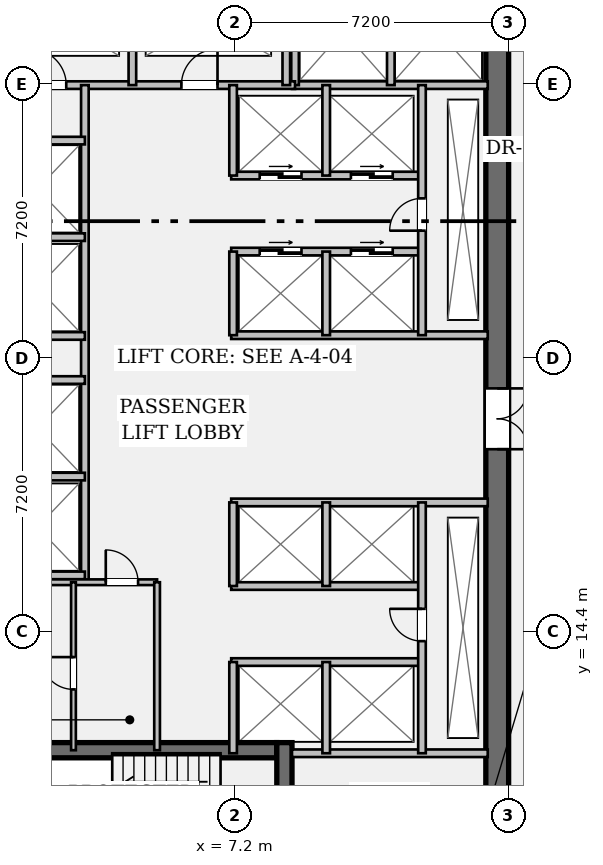
"""IFC4 building model, lengths in metres.
Left out: names, types, materials, properties, quantities, classifications, styles, units other than length and angle.
Written with IfcOpenShell. Run it as: python <this file> out.ifc"""

import sys

from ifc_helpers import new_model, si_unit, direction, frame, frame_2d, origin, place, context, subcontext, project, spatial, rectangle, extrude, element, fill, save


model = new_model("IFC4")
c1 = context("Model", 3, precision=1e-05, world=origin(), true_north=direction((0.0, 1.0)))
c2 = subcontext(c1, "Body", "Model", "MODEL_VIEW")
j1 = project(units=[si_unit("LENGTHUNIT", "METRE"), si_unit("PLANEANGLEUNIT", "RADIAN")], contexts=[c1])
p1 = place(None, origin())
s1 = spatial("IfcSite", under=j1, at=p1, CompositionType="ELEMENT")
p2 = place(p1, origin())
s2 = spatial("IfcBuilding", under=s1, at=p2, CompositionType="ELEMENT")
p3 = place(p2, frame((0.0, 0.0, 46.55)))
s3 = spatial("IfcBuildingStorey", under=s2, at=p3, CompositionType="ELEMENT", Elevation=46.55)
p4 = place(p3, frame((14.1, 35.4, 0.0), z_axis=(0.0, 0.0, 1.0), x_axis=(0.0, -1.0, 0.0)))
e1 = element("IfcWall", 1, at=p4, inside=s3, PredefinedType="SHEAR", context=c2, shape_type="SweptSolid", body=[
    extrude(rectangle(XDim=27.6, YDim=0.6, at=frame_2d((13.8, 0.0))), origin(), (0.0, 0.0, 1.0), 3.57),
])
p5 = place(p4, frame((1.3, 0.0, 0.0)))
e2 = element("IfcOpeningElement", 2, at=p5, cuts=e1, PredefinedType="OPENING", context=c2, shape_type="SweptSolid", body=[
    extrude(rectangle(XDim=1.2, YDim=2.15, at=frame_2d((0.6, 1.075))), frame((0.0, 0.312, 0.0), z_axis=(0.0, -1.0, 0.0), x_axis=(1.0, 0.0, 0.0)), (0.0, 0.0, 1.0), 0.624),
])
p6 = place(p4, frame((25.25, 0.0, 0.0)))
e3 = element("IfcOpeningElement", 3, at=p6, cuts=e1, PredefinedType="OPENING", context=c2, shape_type="SweptSolid", body=[
    extrude(rectangle(XDim=1.2, YDim=2.15, at=frame_2d((0.6, 1.075))), frame((0.0, 0.312, 0.0), z_axis=(0.0, -1.0, 0.0), x_axis=(1.0, 0.0, 0.0)), (0.0, 0.0, 1.0), 0.624),
])
p7 = place(p4, frame((14.6, 0.0, 0.0)))
e4 = element("IfcOpeningElement", 4, at=p7, cuts=e1, PredefinedType="OPENING", context=c2, shape_type="SweptSolid", body=[
    extrude(rectangle(XDim=1.6, YDim=2.2, at=frame_2d((0.8, 1.1))), frame((0.0, 0.312, 0.0), z_axis=(0.0, -1.0, 0.0), x_axis=(1.0, 0.0, 0.0)), (0.0, 0.0, 1.0), 0.624),
])
p8 = place(p3, frame((0.6, 11.28, 0.0), z_axis=(0.0, 0.0, 1.0), x_axis=(1.0, 0.0, 0.0)))
e5 = element("IfcWall", 5, at=p8, inside=s3, PredefinedType="SHEAR", context=c2, shape_type="SweptSolid", body=[
    extrude(rectangle(XDim=7.7, YDim=0.4, at=frame_2d((3.85, 0.0))), origin(), (0.0, 0.0, 1.0), 3.57),
])
p9 = place(p3, frame((8.5, 7.8, 0.0), z_axis=(0.0, 0.0, 1.0), x_axis=(0.0, 1.0, 0.0)))
e6 = element("IfcWall", 6, at=p9, inside=s3, PredefinedType="SHEAR", context=c2, shape_type="SweptSolid", body=[
    extrude(rectangle(XDim=3.68, YDim=0.4, at=frame_2d((1.84, 0.0))), origin(), (0.0, 0.0, 1.0), 3.57),
])
p10 = place(p9, frame((0.85, 0.0, 0.0)))
e7 = element("IfcOpeningElement", 7, at=p10, cuts=e6, PredefinedType="OPENING", context=c2, shape_type="SweptSolid", body=[
    extrude(rectangle(XDim=1.1, YDim=2.15, at=frame_2d((0.55, 1.075))), frame((0.0, 0.212, 0.0), z_axis=(0.0, -1.0, 0.0), x_axis=(1.0, 0.0, 0.0)), (0.0, 0.0, 1.0), 0.424),
])
for number, where, z_axis, x_axis in (
    (8, (8.7, 11.2, 0.0), (0.0, 0.0, 1.0), (1.0, 0.0, 0.0)),
    (9, (8.7, 28.78, 0.0), (0.0, 0.0, 1.0), (1.0, 0.0, 0.0)),
):
    element("IfcWall", number, at=place(p3, frame(where, z_axis=z_axis, x_axis=x_axis)), inside=s3, PredefinedType="PARTITIONING", context=c2, shape_type="SweptSolid", body=[
        extrude(rectangle(XDim=5.15, YDim=0.2, at=frame_2d((2.575, 0.0))), origin(), (0.0, 0.0, 1.0), 3.57),
    ])
for number, where, z_axis, x_axis in (
    (10, (8.78, 28.78, 0.0), (0.0, 0.0, 1.0), (0.0, 1.0, 0.0)),
    (11, (11.3, 28.78, 0.0), (0.0, 0.0, 1.0), (0.0, 1.0, 0.0)),
):
    element("IfcWall", number, at=place(p3, frame(where, z_axis=z_axis, x_axis=x_axis)), inside=s3, PredefinedType="PARTITIONING", context=c2, shape_type="SweptSolid", body=[
        extrude(rectangle(XDim=3.1, YDim=0.2, at=frame_2d((1.55, 0.0))), origin(), (0.0, 0.0, 1.0), 3.57),
    ])
p11 = place(p3, frame((0.6, 28.78, 0.0), z_axis=(0.0, 0.0, 1.0), x_axis=(1.0, 0.0, 0.0)))
e12 = element("IfcWall", 12, at=p11, inside=s3, PredefinedType="PARTITIONING", context=c2, shape_type="SweptSolid", body=[
    extrude(rectangle(XDim=8.18, YDim=0.2, at=frame_2d((4.09, 0.0))), origin(), (0.0, 0.0, 1.0), 3.57),
])
p12 = place(p11, frame((1.21, 0.0, 0.0)))
e13 = element("IfcOpeningElement", 13, at=p12, cuts=e12, PredefinedType="OPENING", context=c2, shape_type="SweptSolid", body=[
    extrude(rectangle(XDim=0.95, YDim=2.15, at=frame_2d((0.475, 1.075))), frame((0.0, 0.112, 0.0), z_axis=(0.0, -1.0, 0.0), x_axis=(1.0, 0.0, 0.0)), (0.0, 0.0, 1.0), 0.224),
])
p13 = place(p11, frame((5.19, 0.0, 0.0)))
e14 = element("IfcOpeningElement", 14, at=p13, cuts=e12, PredefinedType="OPENING", context=c2, shape_type="SweptSolid", body=[
    extrude(rectangle(XDim=0.95, YDim=2.15, at=frame_2d((0.475, 1.075))), frame((0.0, 0.112, 0.0), z_axis=(0.0, -1.0, 0.0), x_axis=(1.0, 0.0, 0.0)), (0.0, 0.0, 1.0), 0.224),
])
for number, where, z_axis, x_axis in (
    (15, (4.5, 28.78, 0.0), (0.0, 0.0, 1.0), (0.0, 1.0, 0.0)),
    (16, (8.55, 28.78, 0.0), (0.0, 0.0, 1.0), (0.0, 1.0, 0.0)),
):
    element("IfcWall", number, at=place(p3, frame(where, z_axis=z_axis, x_axis=x_axis)), inside=s3, PredefinedType="PARTITIONING", context=c2, shape_type="SweptSolid", body=[
        extrude(rectangle(XDim=2.94, YDim=0.2, at=frame_2d((1.47, 0.0))), origin(), (0.0, 0.0, 1.0), 3.57),
    ])
p14 = place(p3, frame((3.25, 15.7, 0.0), z_axis=(0.0, 0.0, 1.0), x_axis=(0.0, 1.0, 0.0)))
e17 = element("IfcWall", 17, at=p14, inside=s3, PredefinedType="PARTITIONING", context=c2, shape_type="SweptSolid", body=[
    extrude(rectangle(XDim=13.08, YDim=0.2, at=frame_2d((6.54, 0.0))), origin(), (0.0, 0.0, 1.0), 3.57),
])
for number, where, z_axis, x_axis in (
    (18, (0.6, 15.88, 0.0), (0.0, 0.0, 1.0), (1.0, 0.0, 0.0)),
    (19, (0.6, 18.48, 0.0), (0.0, 0.0, 1.0), (1.0, 0.0, 0.0)),
    (20, (0.6, 22.18, 0.0), (0.0, 0.0, 1.0), (1.0, 0.0, 0.0)),
    (21, (0.6, 24.78, 0.0), (0.0, 0.0, 1.0), (1.0, 0.0, 0.0)),
    (22, (0.6, 21.02, 0.0), (0.0, 0.0, 1.0), (1.0, 0.0, 0.0)),
    (23, (0.6, 27.32, 0.0), (0.0, 0.0, 1.0), (1.0, 0.0, 0.0)),
):
    element("IfcWall", number, at=place(p3, frame(where, z_axis=z_axis, x_axis=x_axis)), inside=s3, PredefinedType="PARTITIONING", context=c2, shape_type="SweptSolid", body=[
        extrude(rectangle(XDim=2.65, YDim=0.2, at=frame_2d((1.325, 0.0))), origin(), (0.0, 0.0, 1.0), 3.57),
    ])
p15 = place(p3, frame((7.1, 22.2, 0.0), z_axis=(0.0, 0.0, 1.0), x_axis=(1.0, 0.0, 0.0)))
e24 = element("IfcWall", 24, at=p15, inside=s3, PredefinedType="PARTITIONING", context=c2, shape_type="SweptSolid", body=[
    extrude(rectangle(XDim=6.75, YDim=0.2, at=frame_2d((3.375, 0.0))), origin(), (0.0, 0.0, 1.0), 3.57),
])
p16 = place(p3, frame((7.1, 24.4, 0.0), z_axis=(0.0, 0.0, 1.0), x_axis=(1.0, 0.0, 0.0)))
e25 = element("IfcWall", 25, at=p16, inside=s3, PredefinedType="PARTITIONING", context=c2, shape_type="SweptSolid", body=[
    extrude(rectangle(XDim=5.02, YDim=0.2, at=frame_2d((2.51, 0.0))), origin(), (0.0, 0.0, 1.0), 3.57),
])
p17 = place(p16, frame((0.75, 0.0, 0.0)))
e26 = element("IfcOpeningElement", 26, at=p17, cuts=e25, PredefinedType="OPENING", context=c2, shape_type="SweptSolid", body=[
    extrude(rectangle(XDim=1.1, YDim=2.2, at=frame_2d((0.55, 1.1))), frame((0.0, 0.112, 0.0), z_axis=(0.0, -1.0, 0.0), x_axis=(1.0, 0.0, 0.0)), (0.0, 0.0, 1.0), 0.224),
])
p18 = place(p16, frame((3.15, 0.0, 0.0)))
e27 = element("IfcOpeningElement", 27, at=p18, cuts=e25, PredefinedType="OPENING", context=c2, shape_type="SweptSolid", body=[
    extrude(rectangle(XDim=1.1, YDim=2.2, at=frame_2d((0.55, 1.1))), frame((0.0, 0.112, 0.0), z_axis=(0.0, -1.0, 0.0), x_axis=(1.0, 0.0, 0.0)), (0.0, 0.0, 1.0), 0.224),
])
p19 = place(p3, frame((7.1, 26.4, 0.0), z_axis=(0.0, 0.0, 1.0), x_axis=(1.0, 0.0, 0.0)))
e28 = element("IfcWall", 28, at=p19, inside=s3, PredefinedType="PARTITIONING", context=c2, shape_type="SweptSolid", body=[
    extrude(rectangle(XDim=5.02, YDim=0.2, at=frame_2d((2.51, 0.0))), origin(), (0.0, 0.0, 1.0), 3.57),
])
p20 = place(p19, frame((0.75, 0.0, 0.0)))
e29 = element("IfcOpeningElement", 29, at=p20, cuts=e28, PredefinedType="OPENING", context=c2, shape_type="SweptSolid", body=[
    extrude(rectangle(XDim=1.1, YDim=2.2, at=frame_2d((0.55, 1.1))), frame((0.0, 0.112, 0.0), z_axis=(0.0, -1.0, 0.0), x_axis=(1.0, 0.0, 0.0)), (0.0, 0.0, 1.0), 0.224),
])
p21 = place(p19, frame((3.15, 0.0, 0.0)))
e30 = element("IfcOpeningElement", 30, at=p21, cuts=e28, PredefinedType="OPENING", context=c2, shape_type="SweptSolid", body=[
    extrude(rectangle(XDim=1.1, YDim=2.2, at=frame_2d((0.55, 1.1))), frame((0.0, 0.112, 0.0), z_axis=(0.0, -1.0, 0.0), x_axis=(1.0, 0.0, 0.0)), (0.0, 0.0, 1.0), 0.224),
])
p22 = place(p3, frame((7.15, 22.2, 0.0), z_axis=(0.0, 0.0, 1.0), x_axis=(0.0, 1.0, 0.0)))
e31 = element("IfcWall", 31, at=p22, inside=s3, PredefinedType="PARTITIONING", context=c2, shape_type="SweptSolid", body=[
    extrude(rectangle(XDim=2.2, YDim=0.2, at=frame_2d((1.1, 0.0))), origin(), (0.0, 0.0, 1.0), 3.57),
])
p23 = place(p3, frame((7.15, 26.4, 0.0), z_axis=(0.0, 0.0, 1.0), x_axis=(0.0, 1.0, 0.0)))
e32 = element("IfcWall", 32, at=p23, inside=s3, PredefinedType="PARTITIONING", context=c2, shape_type="SweptSolid", body=[
    extrude(rectangle(XDim=2.38, YDim=0.2, at=frame_2d((1.19, 0.0))), origin(), (0.0, 0.0, 1.0), 3.57),
])
p24 = place(p3, frame((9.6, 22.2, 0.0), z_axis=(0.0, 0.0, 1.0), x_axis=(0.0, 1.0, 0.0)))
e33 = element("IfcWall", 33, at=p24, inside=s3, PredefinedType="PARTITIONING", context=c2, shape_type="SweptSolid", body=[
    extrude(rectangle(XDim=2.2, YDim=0.2, at=frame_2d((1.1, 0.0))), origin(), (0.0, 0.0, 1.0), 3.57),
])
p25 = place(p3, frame((9.6, 26.4, 0.0), z_axis=(0.0, 0.0, 1.0), x_axis=(0.0, 1.0, 0.0)))
e34 = element("IfcWall", 34, at=p25, inside=s3, PredefinedType="PARTITIONING", context=c2, shape_type="SweptSolid", body=[
    extrude(rectangle(XDim=2.38, YDim=0.2, at=frame_2d((1.19, 0.0))), origin(), (0.0, 0.0, 1.0), 3.57),
])
p26 = place(p3, frame((12.12, 22.2, 0.0), z_axis=(0.0, 0.0, 1.0), x_axis=(0.0, 1.0, 0.0)))
e35 = element("IfcWall", 35, at=p26, inside=s3, PredefinedType="PARTITIONING", context=c2, shape_type="SweptSolid", body=[
    extrude(rectangle(XDim=6.58, YDim=0.2, at=frame_2d((3.29, 0.0))), origin(), (0.0, 0.0, 1.0), 3.57),
])
p27 = place(p26, frame((2.75, 0.0, 0.0)))
e36 = element("IfcOpeningElement", 36, at=p27, cuts=e35, PredefinedType="OPENING", context=c2, shape_type="SweptSolid", body=[
    extrude(rectangle(XDim=0.85, YDim=2.15, at=frame_2d((0.425, 1.075))), frame((0.0, 0.112, 0.0), z_axis=(0.0, -1.0, 0.0), x_axis=(1.0, 0.0, 0.0)), (0.0, 0.0, 1.0), 0.224),
])
p28 = place(p3, frame((7.1, 17.8, 0.0), z_axis=(0.0, 0.0, 1.0), x_axis=(1.0, 0.0, 0.0)))
e37 = element("IfcWall", 37, at=p28, inside=s3, PredefinedType="PARTITIONING", context=c2, shape_type="SweptSolid", body=[
    extrude(rectangle(XDim=6.75, YDim=0.2, at=frame_2d((3.375, 0.0))), origin(), (0.0, 0.0, 1.0), 3.57),
])
for number, where, z_axis, x_axis in (
    (38, (7.1, 15.6, 0.0), (0.0, 0.0, 1.0), (1.0, 0.0, 0.0)),
    (39, (7.1, 13.6, 0.0), (0.0, 0.0, 1.0), (1.0, 0.0, 0.0)),
):
    element("IfcWall", number, at=place(p3, frame(where, z_axis=z_axis, x_axis=x_axis)), inside=s3, PredefinedType="PARTITIONING", context=c2, shape_type="SweptSolid", body=[
        extrude(rectangle(XDim=5.02, YDim=0.2, at=frame_2d((2.51, 0.0))), origin(), (0.0, 0.0, 1.0), 3.57),
    ])
p29 = place(p3, frame((7.15, 15.6, 0.0), z_axis=(0.0, 0.0, 1.0), x_axis=(0.0, 1.0, 0.0)))
e40 = element("IfcWall", 40, at=p29, inside=s3, PredefinedType="PARTITIONING", context=c2, shape_type="SweptSolid", body=[
    extrude(rectangle(XDim=2.2, YDim=0.2, at=frame_2d((1.1, 0.0))), origin(), (0.0, 0.0, 1.0), 3.57),
])
p30 = place(p3, frame((7.15, 11.2, 0.0), z_axis=(0.0, 0.0, 1.0), x_axis=(0.0, 1.0, 0.0)))
e41 = element("IfcWall", 41, at=p30, inside=s3, PredefinedType="PARTITIONING", context=c2, shape_type="SweptSolid", body=[
    extrude(rectangle(XDim=2.4, YDim=0.2, at=frame_2d((1.2, 0.0))), origin(), (0.0, 0.0, 1.0), 3.57),
])
p31 = place(p3, frame((9.6, 15.6, 0.0), z_axis=(0.0, 0.0, 1.0), x_axis=(0.0, 1.0, 0.0)))
e42 = element("IfcWall", 42, at=p31, inside=s3, PredefinedType="PARTITIONING", context=c2, shape_type="SweptSolid", body=[
    extrude(rectangle(XDim=2.2, YDim=0.2, at=frame_2d((1.1, 0.0))), origin(), (0.0, 0.0, 1.0), 3.57),
])
p32 = place(p3, frame((9.6, 11.2, 0.0), z_axis=(0.0, 0.0, 1.0), x_axis=(0.0, 1.0, 0.0)))
e43 = element("IfcWall", 43, at=p32, inside=s3, PredefinedType="PARTITIONING", context=c2, shape_type="SweptSolid", body=[
    extrude(rectangle(XDim=2.4, YDim=0.2, at=frame_2d((1.2, 0.0))), origin(), (0.0, 0.0, 1.0), 3.57),
])
p33 = place(p3, frame((12.12, 11.2, 0.0), z_axis=(0.0, 0.0, 1.0), x_axis=(0.0, 1.0, 0.0)))
e44 = element("IfcWall", 44, at=p33, inside=s3, PredefinedType="PARTITIONING", context=c2, shape_type="SweptSolid", body=[
    extrude(rectangle(XDim=6.6, YDim=0.2, at=frame_2d((3.3, 0.0))), origin(), (0.0, 0.0, 1.0), 3.57),
])
p34 = place(p33, frame((2.95, 0.0, 0.0)))
e45 = element("IfcOpeningElement", 45, at=p34, cuts=e44, PredefinedType="OPENING", context=c2, shape_type="SweptSolid", body=[
    extrude(rectangle(XDim=0.85, YDim=2.15, at=frame_2d((0.425, 1.075))), frame((0.0, 0.112, 0.0), z_axis=(0.0, -1.0, 0.0), x_axis=(1.0, 0.0, 0.0)), (0.0, 0.0, 1.0), 0.224),
])
p35 = place(p3, frame((0.6, 15.7, 0.0), z_axis=(0.0, 0.0, 1.0), x_axis=(1.0, 0.0, 0.0)))
e46 = element("IfcWall", 46, at=p35, inside=s3, PredefinedType="PARTITIONING", context=c2, shape_type="SweptSolid", body=[
    extrude(rectangle(XDim=4.55, YDim=0.15, at=frame_2d((2.275, 0.0))), origin(), (0.0, 0.0, 1.0), 3.57),
])
p36 = place(p35, frame((3.2, 0.0, 0.0)))
e47 = element("IfcOpeningElement", 47, at=p36, cuts=e46, PredefinedType="OPENING", context=c2, shape_type="SweptSolid", body=[
    extrude(rectangle(XDim=0.85, YDim=2.15, at=frame_2d((0.425, 1.075))), frame((0.0, 0.087, 0.0), z_axis=(0.0, -1.0, 0.0), x_axis=(1.0, 0.0, 0.0)), (0.0, 0.0, 1.0), 0.174),
])
p37 = place(p3, frame((5.15, 11.28, 0.0), z_axis=(0.0, 0.0, 1.0), x_axis=(0.0, 1.0, 0.0)))
e48 = element("IfcWall", 48, at=p37, inside=s3, PredefinedType="PARTITIONING", context=c2, shape_type="SweptSolid", body=[
    extrude(rectangle(XDim=4.42, YDim=0.15, at=frame_2d((2.21, 0.0))), origin(), (0.0, 0.0, 1.0), 3.57),
])
p38 = place(p3, frame((2.95, 11.28, 0.0), z_axis=(0.0, 0.0, 1.0), x_axis=(0.0, 1.0, 0.0)))
e49 = element("IfcWall", 49, at=p38, inside=s3, PredefinedType="PARTITIONING", context=c2, shape_type="SweptSolid", body=[
    extrude(rectangle(XDim=4.42, YDim=0.125, at=frame_2d((2.21, 0.0))), origin(), (0.0, 0.0, 1.0), 3.57),
])
p39 = place(p38, frame((1.6, 0.0, 0.0)))
e50 = element("IfcOpeningElement", 50, at=p39, cuts=e49, PredefinedType="OPENING", context=c2, shape_type="SweptSolid", body=[
    extrude(rectangle(XDim=0.85, YDim=2.15, at=frame_2d((0.425, 1.075))), frame((0.0, 0.074, 0.0), z_axis=(0.0, -1.0, 0.0), x_axis=(1.0, 0.0, 0.0)), (0.0, 0.0, 1.0), 0.149),
])
p40 = place(p12, origin())
e51 = element("IfcDoor", 51, at=p40, inside=s3, OperationType="SINGLE_SWING_LEFT", PredefinedType="DOOR", context=c2, shape_type="SweptSolid", body=[
    extrude(rectangle(XDim=0.95, YDim=2.15, at=frame_2d((0.475, 1.075))), frame((0.0, 0.025, 0.0), z_axis=(0.0, -1.0, 0.0), x_axis=(1.0, 0.0, 0.0)), (0.0, 0.0, 1.0), 0.05),
])
fill(e13, e51)
p41 = place(p13, origin())
e52 = element("IfcDoor", 52, at=p41, inside=s3, OperationType="SINGLE_SWING_RIGHT", PredefinedType="DOOR", context=c2, shape_type="SweptSolid", body=[
    extrude(rectangle(XDim=0.95, YDim=2.15, at=frame_2d((0.475, 1.075))), frame((0.0, 0.025, 0.0), z_axis=(0.0, -1.0, 0.0), x_axis=(1.0, 0.0, 0.0)), (0.0, 0.0, 1.0), 0.05),
])
fill(e14, e52)
p42 = place(p7, origin())
e53 = element("IfcDoor", 53, at=p42, inside=s3, OperationType="DOUBLE_DOOR_SINGLE_SWING", PredefinedType="DOOR", context=c2, shape_type="SweptSolid", body=[
    extrude(rectangle(XDim=1.6, YDim=2.2, at=frame_2d((0.8, 1.1))), frame((0.0, 0.025, 0.0), z_axis=(0.0, -1.0, 0.0), x_axis=(1.0, 0.0, 0.0)), (0.0, 0.0, 1.0), 0.05),
])
fill(e4, e53)
p43 = place(p27, origin())
e54 = element("IfcDoor", 54, at=p43, inside=s3, OperationType="SINGLE_SWING_LEFT", PredefinedType="DOOR", context=c2, shape_type="SweptSolid", body=[
    extrude(rectangle(XDim=0.85, YDim=2.15, at=frame_2d((0.425, 1.075))), frame((0.0, 0.025, 0.0), z_axis=(0.0, -1.0, 0.0), x_axis=(1.0, 0.0, 0.0)), (0.0, 0.0, 1.0), 0.05),
])
fill(e36, e54)
p44 = place(p17, origin())
e55 = element("IfcDoor", 55, at=p44, inside=s3, OperationType="DOUBLE_DOOR_SLIDING", PredefinedType="DOOR", context=c2, shape_type="SweptSolid", body=[
    extrude(rectangle(XDim=1.1, YDim=2.2, at=frame_2d((0.55, 1.1))), frame((0.0, 0.025, 0.0), z_axis=(0.0, -1.0, 0.0), x_axis=(1.0, 0.0, 0.0)), (0.0, 0.0, 1.0), 0.05),
])
fill(e26, e55)
p45 = place(p18, origin())
e56 = element("IfcDoor", 56, at=p45, inside=s3, OperationType="DOUBLE_DOOR_SLIDING", PredefinedType="DOOR", context=c2, shape_type="SweptSolid", body=[
    extrude(rectangle(XDim=1.1, YDim=2.2, at=frame_2d((0.55, 1.1))), frame((0.0, 0.025, 0.0), z_axis=(0.0, -1.0, 0.0), x_axis=(1.0, 0.0, 0.0)), (0.0, 0.0, 1.0), 0.05),
])
fill(e27, e56)
p46 = place(p20, origin())
e57 = element("IfcDoor", 57, at=p46, inside=s3, OperationType="DOUBLE_DOOR_SLIDING", PredefinedType="DOOR", context=c2, shape_type="SweptSolid", body=[
    extrude(rectangle(XDim=1.1, YDim=2.2, at=frame_2d((0.55, 1.1))), frame((0.0, 0.025, 0.0), z_axis=(0.0, -1.0, 0.0), x_axis=(1.0, 0.0, 0.0)), (0.0, 0.0, 1.0), 0.05),
])
fill(e29, e57)
p47 = place(p21, origin())
e58 = element("IfcDoor", 58, at=p47, inside=s3, OperationType="DOUBLE_DOOR_SLIDING", PredefinedType="DOOR", context=c2, shape_type="SweptSolid", body=[
    extrude(rectangle(XDim=1.1, YDim=2.2, at=frame_2d((0.55, 1.1))), frame((0.0, 0.025, 0.0), z_axis=(0.0, -1.0, 0.0), x_axis=(1.0, 0.0, 0.0)), (0.0, 0.0, 1.0), 0.05),
])
fill(e30, e58)
p48 = place(p34, origin())
e59 = element("IfcDoor", 59, at=p48, inside=s3, OperationType="SINGLE_SWING_RIGHT", PredefinedType="DOOR", context=c2, shape_type="SweptSolid", body=[
    extrude(rectangle(XDim=0.85, YDim=2.15, at=frame_2d((0.425, 1.075))), frame((0.0, 0.025, 0.0), z_axis=(0.0, -1.0, 0.0), x_axis=(1.0, 0.0, 0.0)), (0.0, 0.0, 1.0), 0.05),
])
fill(e45, e59)
p49 = place(p36, origin())
e60 = element("IfcDoor", 60, at=p49, inside=s3, OperationType="SINGLE_SWING_LEFT", PredefinedType="DOOR", context=c2, shape_type="SweptSolid", body=[
    extrude(rectangle(XDim=0.85, YDim=2.15, at=frame_2d((0.425, 1.075))), frame((0.0, 0.025, 0.0), z_axis=(0.0, -1.0, 0.0), x_axis=(1.0, 0.0, 0.0)), (0.0, 0.0, 1.0), 0.05),
])
fill(e47, e60)
p50 = place(p39, origin())
e61 = element("IfcDoor", 61, at=p50, inside=s3, OperationType="SINGLE_SWING_RIGHT", PredefinedType="DOOR", context=c2, shape_type="SweptSolid", body=[
    extrude(rectangle(XDim=0.85, YDim=2.15, at=frame_2d((0.425, 1.075))), frame((0.0, 0.025, 0.0), z_axis=(0.0, -1.0, 0.0), x_axis=(1.0, 0.0, 0.0)), (0.0, 0.0, 1.0), 0.05),
])
fill(e50, e61)
save(model, sys.argv[1])
